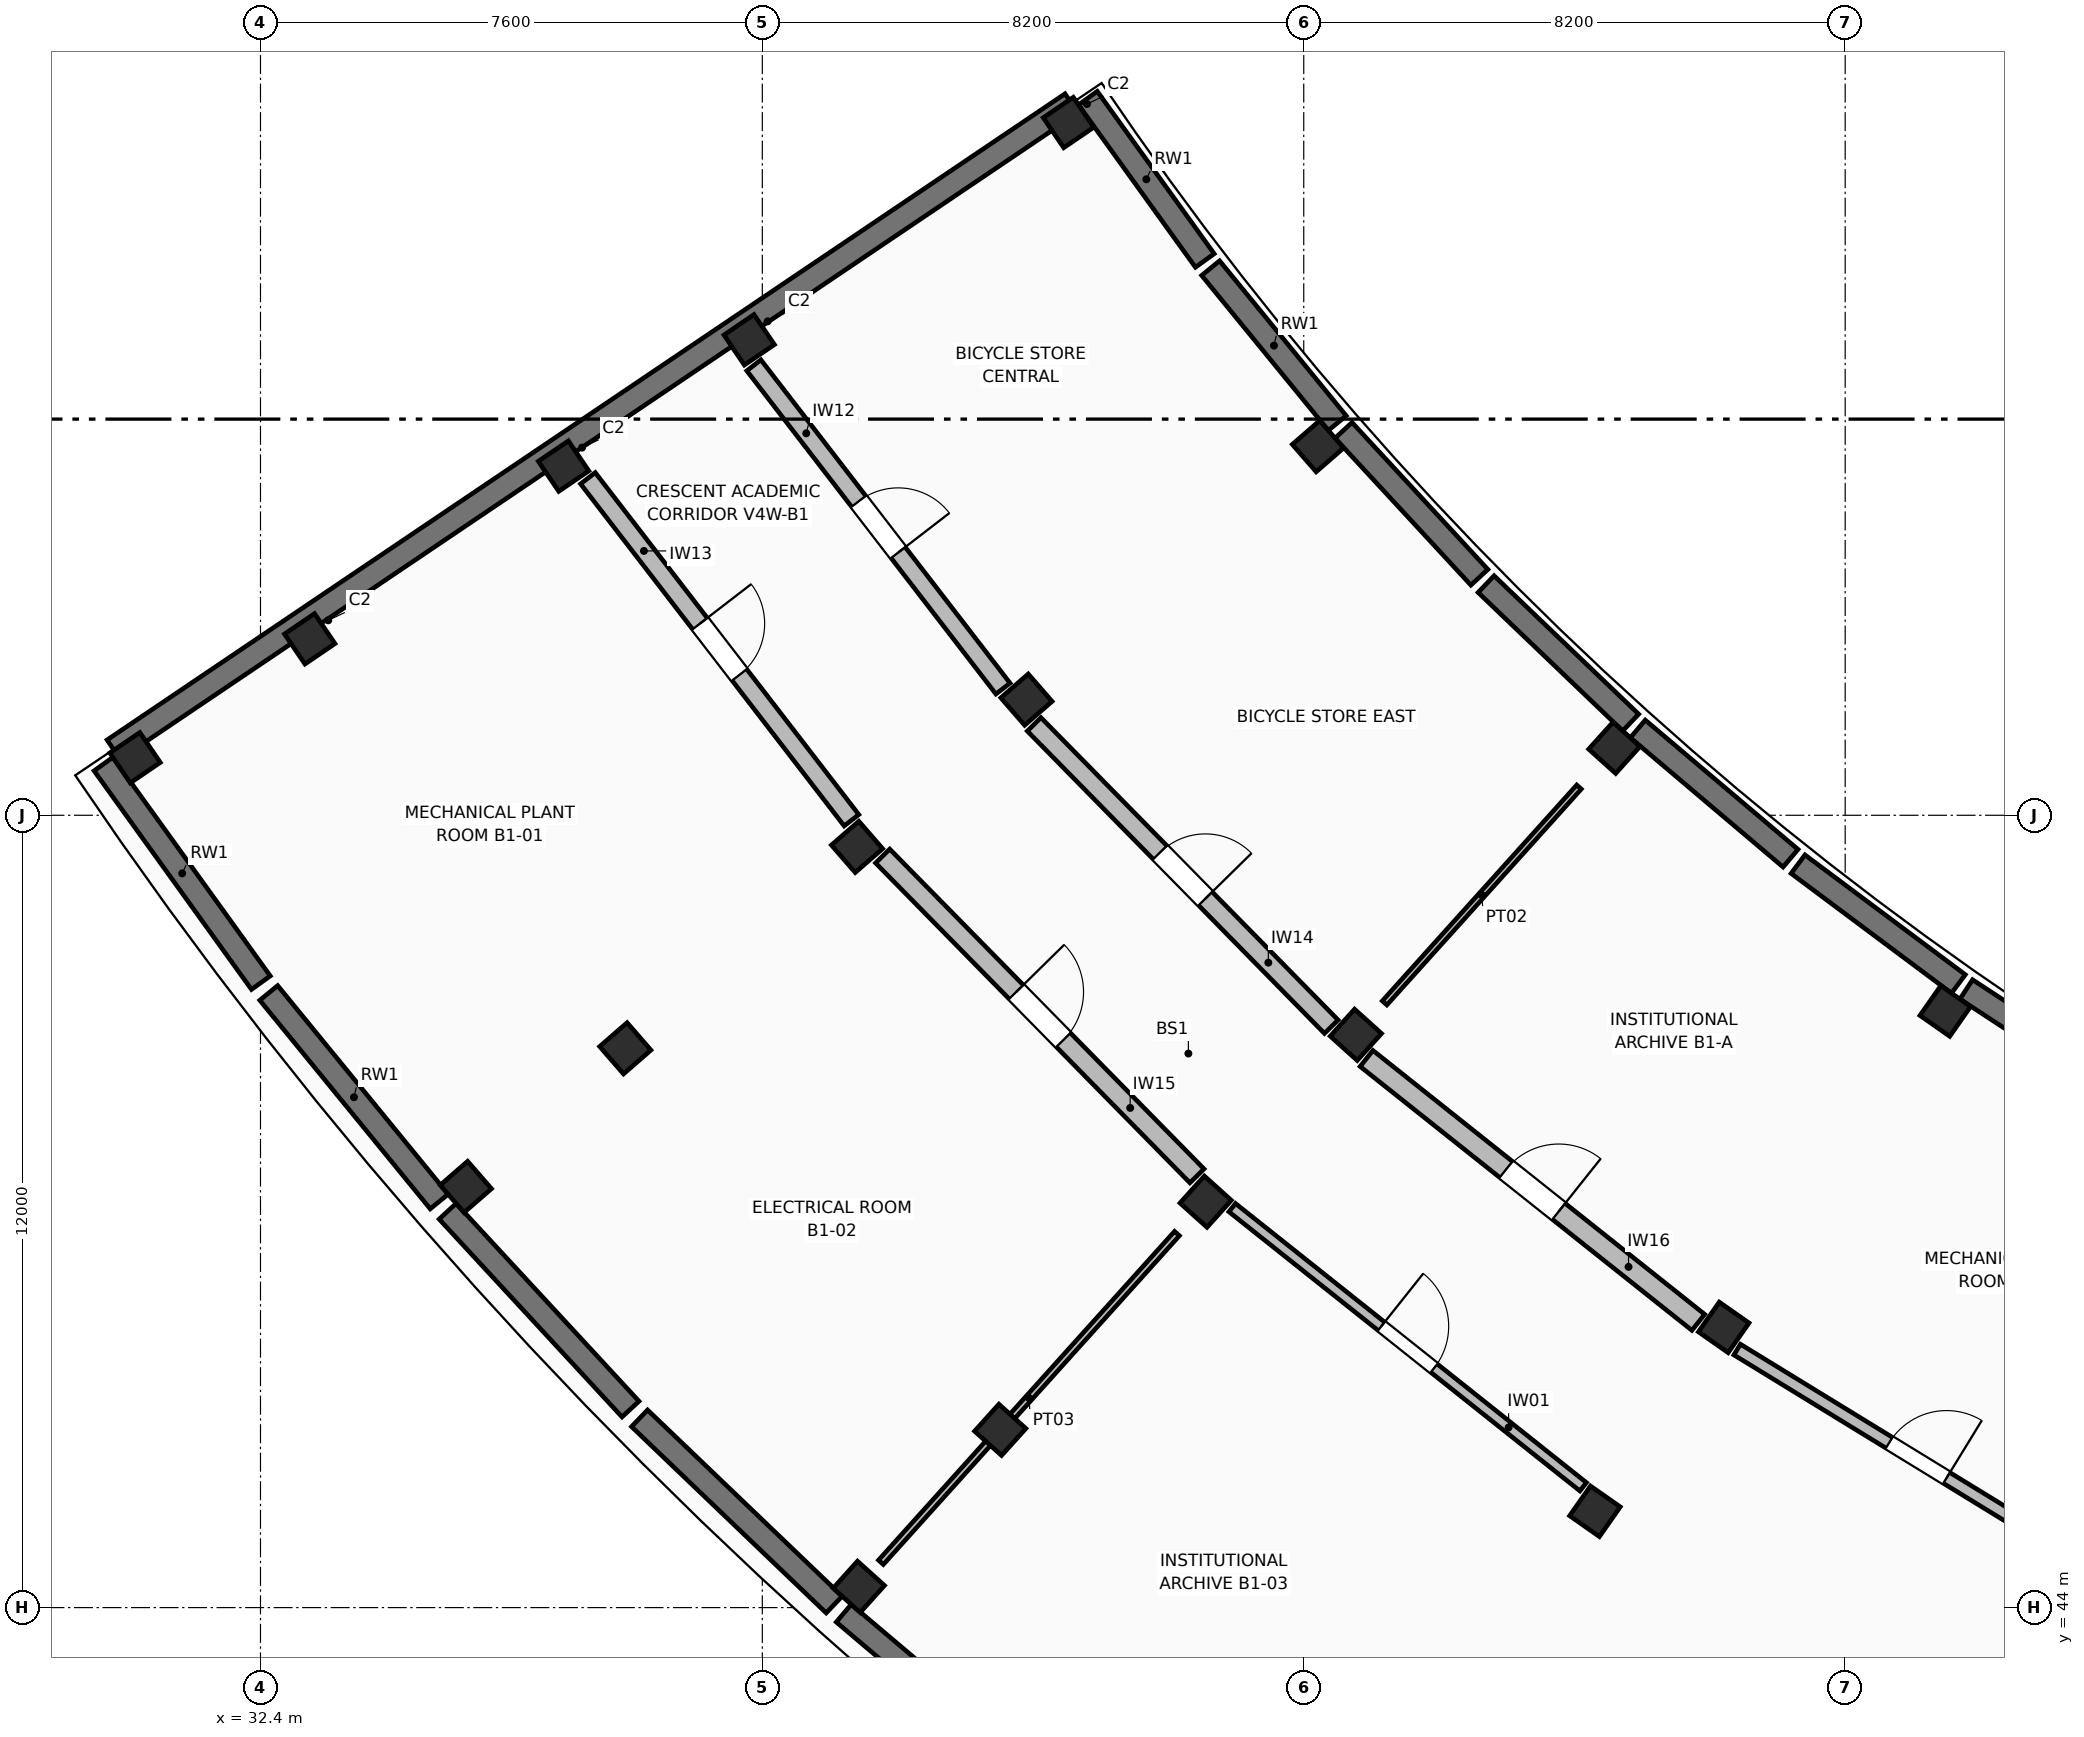
"""IFC4 building model, lengths in metres.
Left out: names, types, materials, properties, quantities, classifications, styles, units other than length and angle.
Written with IfcOpenShell. Run it as: python <this file> out.ifc"""

import sys

from ifc_helpers import new_model, si_unit, direction, frame, frame_2d, origin, origin_2d, place, context, subcontext, project, spatial, rectangle, extrude, element, fill, save


model = new_model("IFC4")
c1 = context("Model", 3, precision=1e-05, world=origin(), true_north=direction((0.0, 1.0)))
c2 = subcontext(c1, "Body", "Model", "MODEL_VIEW")
j1 = project(units=[si_unit("LENGTHUNIT", "METRE"), si_unit("PLANEANGLEUNIT", "RADIAN")], contexts=[c1])
p1 = place(None, origin())
s1 = spatial("IfcSite", under=j1, at=p1, CompositionType="ELEMENT")
p2 = place(p1, origin())
s2 = spatial("IfcBuilding", under=s1, at=p2, CompositionType="ELEMENT")
p3 = place(p2, frame((0.0, 0.0, -4.08)))
s3 = spatial("IfcBuildingStorey", under=s2, at=p3, CompositionType="ELEMENT", Elevation=-4.08)
for number, where, z_axis, x_axis in (
    (1, (44.637, 66.492, 0.0), (0.0, 0.0, 1.0), (-0.827, -0.563, 0.0)),
    (2, (39.801, 63.201, 0.0), (0.0, 0.0, 1.0), (-0.827, -0.563, 0.0)),
    (3, (36.99, 61.288, 0.0), (0.0, 0.0, 1.0), (-0.827, -0.563, 0.0)),
    (4, (33.146, 58.672, 0.0), (0.0, 0.0, 1.0), (-0.827, -0.563, 0.0)),
    (5, (30.5, 56.872, 0.0), (0.0, 0.0, 1.0), (-0.827, -0.563, 0.0)),
    (6, (48.416, 61.59, 0.0), (0.0, 0.0, 1.0), (-0.755, -0.656, 0.0)),
    (7, (44.0, 57.752, 0.0), (0.0, 0.0, 1.0), (-0.755, -0.656, 0.0)),
    (8, (41.434, 55.521, 0.0), (0.0, 0.0, 1.0), (-0.755, -0.656, 0.0)),
    (9, (37.925, 52.47, 0.0), (0.0, 0.0, 1.0), (-0.755, -0.656, 0.0)),
    (10, (35.51, 50.371, 0.0), (0.0, 0.0, 1.0), (-0.755, -0.656, 0.0)),
    (11, (52.904, 57.022, 0.0), (0.0, 0.0, 1.0), (-0.669, -0.743, 0.0)),
    (12, (48.99, 52.675, 0.0), (0.0, 0.0, 1.0), (-0.669, -0.743, 0.0)),
    (13, (46.715, 50.148, 0.0), (0.0, 0.0, 1.0), (-0.669, -0.743, 0.0)),
    (14, (43.603, 46.692, 0.0), (0.0, 0.0, 1.0), (-0.669, -0.743, 0.0)),
    (15, (41.462, 44.314, 0.0), (0.0, 0.0, 1.0), (-0.669, -0.743, 0.0)),
    (16, (57.916, 53.035, 0.0), (0.0, 0.0, 1.0), (-0.574, -0.819, 0.0)),
    (17, (54.561, 48.243, 0.0), (0.0, 0.0, 1.0), (-0.574, -0.819, 0.0)),
    (18, (52.61, 45.458, 0.0), (0.0, 0.0, 1.0), (-0.574, -0.819, 0.0)),
):
    element("IfcColumn", number, at=place(p3, frame(where, z_axis=z_axis, x_axis=x_axis)), inside=s3, PredefinedType="COLUMN", context=c2, shape_type="SweptSolid", body=[
        extrude(rectangle(XDim=0.55, YDim=0.55, at=origin_2d()), origin(), (0.0, 0.0, 1.0), 4.08),
    ])
p4 = place(p3, frame((44.931, 66.862, 0.0), z_axis=(0.0, 0.0, 1.0), x_axis=(0.584251673289, -0.811572536659, 0.0)))
e19 = element("IfcWall", 19, at=p4, inside=s3, PredefinedType="USERDEFINED", context=c2, shape_type="SweptSolid", body=[
    extrude(rectangle(XDim=3.031, YDim=0.35, at=frame_2d((1.515, 0.0))), origin(), (0.0, 0.0, 1.0), 3.065),
])
p5 = place(p3, frame((30.022, 56.775, 0.0), z_axis=(0.0, 0.0, 1.0), x_axis=(0.584279503148, -0.811552501198, 0.0)))
e20 = element("IfcWall", 20, at=p5, inside=s3, PredefinedType="USERDEFINED", context=c2, shape_type="SweptSolid", body=[
    extrude(rectangle(XDim=4.08, YDim=0.35, at=frame_2d((2.04, 0.0))), origin(), (0.0, 0.0, 1.0), 3.065),
])
p6 = place(p3, frame((46.79, 64.287, 0.0), z_axis=(0.0, 0.0, 1.0), x_axis=(0.632706899842, -0.77439136029, 0.0)))
e21 = element("IfcWall", 21, at=p6, inside=s3, PredefinedType="USERDEFINED", context=c2, shape_type="SweptSolid", body=[
    extrude(rectangle(XDim=3.031, YDim=0.35, at=frame_2d((1.516, 0.0))), origin(), (0.0, 0.0, 1.0), 3.065),
])
p7 = place(p3, frame((32.525, 53.309, 0.0), z_axis=(0.0, 0.0, 1.0), x_axis=(0.632696698526, -0.774399695037, 0.0)))
e22 = element("IfcWall", 22, at=p7, inside=s3, PredefinedType="USERDEFINED", context=c2, shape_type="SweptSolid", body=[
    extrude(rectangle(XDim=4.08, YDim=0.35, at=frame_2d((2.04, 0.0))), origin(), (0.0, 0.0, 1.0), 3.065),
])
p8 = place(p3, frame((48.803, 61.83, 0.0), z_axis=(0.0, 0.0, 1.0), x_axis=(0.678811877156, -0.734312219313, 0.0)))
e23 = element("IfcWall", 23, at=p8, inside=s3, PredefinedType="USERDEFINED", context=c2, shape_type="SweptSolid", body=[
    extrude(rectangle(XDim=3.031, YDim=0.35, at=frame_2d((1.515, 0.0))), origin(), (0.0, 0.0, 1.0), 3.065),
])
p9 = place(p3, frame((35.235, 50.002, 0.0), z_axis=(0.0, 0.0, 1.0), x_axis=(0.678764601476, -0.734355919009, 0.0)))
e24 = element("IfcWall", 24, at=p9, inside=s3, PredefinedType="USERDEFINED", context=c2, shape_type="SweptSolid", body=[
    extrude(rectangle(XDim=4.08, YDim=0.35, at=frame_2d((2.04, 0.0))), origin(), (0.0, 0.0, 1.0), 3.065),
])
p10 = place(p3, frame((50.962, 59.501, 0.0), z_axis=(0.0, 0.0, 1.0), x_axis=(0.722363654033, -0.691513377551, 0.0)))
e25 = element("IfcWall", 25, at=p10, inside=s3, PredefinedType="USERDEFINED", context=c2, shape_type="SweptSolid", body=[
    extrude(rectangle(XDim=3.031, YDim=0.35, at=frame_2d((1.516, 0.0))), origin(), (0.0, 0.0, 1.0), 3.065),
])
p11 = place(p3, frame((38.141, 46.867, 0.0), z_axis=(0.0, 0.0, 1.0), x_axis=(0.722376692903, -0.691499756725, 0.0)))
e26 = element("IfcWall", 26, at=p11, inside=s3, PredefinedType="USERDEFINED", context=c2, shape_type="SweptSolid", body=[
    extrude(rectangle(XDim=4.08, YDim=0.35, at=frame_2d((2.04, 0.0))), origin(), (0.0, 0.0, 1.0), 3.065),
])
p12 = place(p3, frame((53.259, 57.308, 0.0), z_axis=(0.0, 0.0, 1.0), x_axis=(0.763239603692, -0.646115552635, 0.0)))
e27 = element("IfcWall", 27, at=p12, inside=s3, PredefinedType="USERDEFINED", context=c2, shape_type="SweptSolid", body=[
    extrude(rectangle(XDim=3.031, YDim=0.35, at=frame_2d((1.515, 0.0))), origin(), (0.0, 0.0, 1.0), 3.065),
])
p13 = place(p3, frame((41.234, 43.915, 0.0), z_axis=(0.0, 0.0, 1.0), x_axis=(0.763204670494, -0.646156816057, 0.0)))
e28 = element("IfcWall", 28, at=p13, inside=s3, PredefinedType="USERDEFINED", context=c2, shape_type="SweptSolid", body=[
    extrude(rectangle(XDim=4.08, YDim=0.35, at=frame_2d((2.04, 0.0))), origin(), (0.0, 0.0, 1.0), 3.065),
])
p14 = place(p3, frame((55.686, 55.259, 0.0), z_axis=(0.0, 0.0, 1.0), x_axis=(0.801245208732, -0.598336122496, 0.0)))
e29 = element("IfcWall", 29, at=p14, inside=s3, PredefinedType="USERDEFINED", context=c2, shape_type="SweptSolid", body=[
    extrude(rectangle(XDim=3.031, YDim=0.35, at=frame_2d((1.515, 0.0))), origin(), (0.0, 0.0, 1.0), 3.065),
])
p15 = place(p3, frame((58.234, 53.363, 0.0), z_axis=(0.0, 0.0, 1.0), x_axis=(0.836276459037, -0.548308019328, 0.0)))
e30 = element("IfcWall", 30, at=p15, inside=s3, PredefinedType="USERDEFINED", context=c2, shape_type="SweptSolid", body=[
    extrude(rectangle(XDim=3.031, YDim=0.35, at=frame_2d((1.516, 0.0))), origin(), (0.0, 0.0, 1.0), 3.065),
])
p16 = place(p3, frame((44.683, 66.782, 0.0), z_axis=(0.0, 0.0, 1.0), x_axis=(-0.829039791681, -0.559189613468, 0.0)))
e31 = element("IfcWall", 31, at=p16, inside=s3, PredefinedType="USERDEFINED", context=c2, shape_type="SweptSolid", body=[
    extrude(rectangle(XDim=17.5, YDim=0.35, at=frame_2d((8.75, 0.0))), origin(), (0.0, 0.0, 1.0), 3.065),
])
p17 = place(p3, frame((39.872, 62.815, 0.0), z_axis=(0.0, 0.0, 1.0), x_axis=(0.610376740954, -0.79211125109, 0.0)))
e32 = element("IfcWall", 32, at=p17, inside=s3, PredefinedType="STANDARD", context=c2, shape_type="SweptSolid", body=[
    extrude(rectangle(XDim=6.181, YDim=0.27, at=frame_2d((3.09, 0.0))), origin(), (0.0, 0.0, 1.0), 2.72),
])
p18 = place(p17, frame((2.601, 0.0, 0.0)))
e33 = element("IfcOpeningElement", 33, at=p18, cuts=e32, PredefinedType="OPENING", context=c2, shape_type="SweptSolid", body=[
    extrude(rectangle(XDim=0.98, YDim=2.12, at=frame_2d((0.49, 1.06))), frame((0.0, 0.145, 0.0), z_axis=(0.0, -1.0, 0.0), x_axis=(1.0, 0.0, 0.0)), (0.0, 0.0, 1.0), 0.29),
])
p19 = place(p3, frame((37.359, 61.104, 0.0), z_axis=(0.0, 0.0, 1.0), x_axis=(0.610378079511, -0.792110219637, 0.0)))
e34 = element("IfcWall", 34, at=p19, inside=s3, PredefinedType="STANDARD", context=c2, shape_type="SweptSolid", body=[
    extrude(rectangle(XDim=6.54, YDim=0.28, at=frame_2d((3.27, 0.0))), origin(), (0.0, 0.0, 1.0), 2.72),
])
p20 = place(p19, frame((2.78, 0.0, 0.0)))
e35 = element("IfcOpeningElement", 35, at=p20, cuts=e34, PredefinedType="OPENING", context=c2, shape_type="SweptSolid", body=[
    extrude(rectangle(XDim=0.98, YDim=2.18, at=frame_2d((0.49, 1.09))), frame((0.0, 0.15, 0.0), z_axis=(0.0, -1.0, 0.0), x_axis=(1.0, 0.0, 0.0)), (0.0, 0.0, 1.0), 0.3),
])
p21 = place(p3, frame((44.117, 57.377, 0.0), z_axis=(0.0, 0.0, 1.0), x_axis=(0.700900509406, -0.713259052459, 0.0)))
e36 = element("IfcWall", 36, at=p21, inside=s3, PredefinedType="STANDARD", context=c2, shape_type="SweptSolid", body=[
    extrude(rectangle(XDim=6.42, YDim=0.29, at=frame_2d((3.21, 0.0))), origin(), (0.0, 0.0, 1.0), 2.72),
])
p22 = place(p21, frame((2.72, 0.0, 0.0)))
e37 = element("IfcOpeningElement", 37, at=p22, cuts=e36, PredefinedType="OPENING", context=c2, shape_type="SweptSolid", body=[
    extrude(rectangle(XDim=0.98, YDim=2.24, at=frame_2d((0.49, 1.12))), frame((0.0, 0.155, 0.0), z_axis=(0.0, -1.0, 0.0), x_axis=(1.0, 0.0, 0.0)), (0.0, 0.0, 1.0), 0.31),
])
p23 = place(p3, frame((41.823, 55.383, 0.0), z_axis=(0.0, 0.0, 1.0), x_axis=(0.700914816473, -0.713244993006, 0.0)))
e38 = element("IfcWall", 38, at=p23, inside=s3, PredefinedType="STANDARD", context=c2, shape_type="SweptSolid", body=[
    extrude(rectangle(XDim=6.792, YDim=0.3, at=frame_2d((3.396, 0.0))), origin(), (0.0, 0.0, 1.0), 2.72),
])
p24 = place(p23, frame((2.886, 0.0, 0.0)))
e39 = element("IfcOpeningElement", 39, at=p24, cuts=e38, PredefinedType="OPENING", context=c2, shape_type="SweptSolid", body=[
    extrude(rectangle(XDim=1.02, YDim=2.06, at=frame_2d((0.51, 1.03))), frame((0.0, 0.16, 0.0), z_axis=(0.0, -1.0, 0.0), x_axis=(1.0, 0.0, 0.0)), (0.0, 0.0, 1.0), 0.32),
])
p25 = place(p3, frame((49.151, 52.317, 0.0), z_axis=(0.0, 0.0, 1.0), x_axis=(0.782605685559, -0.622517743467, 0.0)))
e40 = element("IfcWall", 40, at=p25, inside=s3, PredefinedType="STANDARD", context=c2, shape_type="SweptSolid", body=[
    extrude(rectangle(XDim=6.42, YDim=0.31, at=frame_2d((3.21, 0.0))), origin(), (0.0, 0.0, 1.0), 2.72),
])
p26 = place(p25, frame((2.7, 0.0, 0.0)))
e41 = element("IfcOpeningElement", 41, at=p26, cuts=e40, PredefinedType="OPENING", context=c2, shape_type="SweptSolid", body=[
    extrude(rectangle(XDim=1.02, YDim=2.12, at=frame_2d((0.51, 1.06))), frame((0.0, 0.165, 0.0), z_axis=(0.0, -1.0, 0.0), x_axis=(1.0, 0.0, 0.0)), (0.0, 0.0, 1.0), 0.33),
])
p27 = place(p3, frame((47.117, 50.058, 0.0), z_axis=(0.0, 0.0, 1.0), x_axis=(0.782615780998, -0.622505051653, 0.0)))
e42 = element("IfcWall", 42, at=p27, inside=s3, PredefinedType="STANDARD", context=c2, shape_type="SweptSolid", body=[
    extrude(rectangle(XDim=6.792, YDim=0.16, at=frame_2d((3.396, 0.0))), origin(), (0.0, 0.0, 1.0), 2.72),
])
p28 = place(p27, frame((2.886, 0.0, 0.0)))
e43 = element("IfcOpeningElement", 43, at=p28, cuts=e42, PredefinedType="OPENING", context=c2, shape_type="SweptSolid", body=[
    extrude(rectangle(XDim=1.02, YDim=2.18, at=frame_2d((0.51, 1.09))), frame((0.0, 0.09, 0.0), z_axis=(0.0, -1.0, 0.0), x_axis=(1.0, 0.0, 0.0)), (0.0, 0.0, 1.0), 0.18),
])
p29 = place(p3, frame((52.369, 56.427, 0.0), z_axis=(0.0, 0.0, 1.0), x_axis=(-0.669157836149, -0.743120306761, 0.0)))
e44 = element("IfcWall", 44, at=p29, inside=s3, PredefinedType="PARTITIONING", context=c2, shape_type="SweptSolid", body=[
    extrude(rectangle(XDim=4.4, YDim=0.092, at=frame_2d((2.2, 0.0))), origin(), (0.0, 0.0, 1.0), 2.72),
])
p30 = place(p3, frame((46.28, 49.665, 0.0), z_axis=(0.0, 0.0, 1.0), x_axis=(-0.669115705072, -0.743158242386, 0.0)))
e45 = element("IfcWall", 45, at=p30, inside=s3, PredefinedType="PARTITIONING", context=c2, shape_type="SweptSolid", body=[
    extrude(rectangle(XDim=6.7, YDim=0.098, at=frame_2d((3.35, 0.0))), origin(), (0.0, 0.0, 1.0), 2.72),
])
p31 = place(p3, frame((54.764, 47.908, 0.0), z_axis=(0.0, 0.0, 1.0), x_axis=(0.852626937867, -0.522520147767, 0.0)))
e46 = element("IfcWall", 46, at=p31, inside=s3, PredefinedType="STANDARD", context=c2, shape_type="SweptSolid", body=[
    extrude(rectangle(XDim=6.42, YDim=0.19, at=frame_2d((3.21, 0.0))), origin(), (0.0, 0.0, 1.0), 2.72),
])
p32 = place(p31, frame((2.7, 0.0, 0.0)))
e47 = element("IfcOpeningElement", 47, at=p32, cuts=e46, PredefinedType="OPENING", context=c2, shape_type="SweptSolid", body=[
    extrude(rectangle(XDim=1.02, YDim=2.24, at=frame_2d((0.51, 1.12))), frame((0.0, 0.105, 0.0), z_axis=(0.0, -1.0, 0.0), x_axis=(1.0, 0.0, 0.0)), (0.0, 0.0, 1.0), 0.21),
])
p33 = place(p18, frame((0.98, 0.0, 0.0), z_axis=(0.0, 0.0, 1.0), x_axis=(-1.0, 0.0, 0.0)))
e48 = element("IfcDoor", 48, at=p33, inside=s3, OperationType="SINGLE_SWING_RIGHT", PredefinedType="DOOR", context=c2, shape_type="SweptSolid", body=[
    extrude(rectangle(XDim=0.98, YDim=2.12, at=frame_2d((0.49, 1.06))), frame((0.0, 0.025, 0.0), z_axis=(0.0, -1.0, 0.0), x_axis=(1.0, 0.0, 0.0)), (0.0, 0.0, 1.0), 0.05),
])
fill(e33, e48)
p34 = place(p20, origin())
e49 = element("IfcDoor", 49, at=p34, inside=s3, OperationType="SINGLE_SWING_LEFT", PredefinedType="DOOR", context=c2, shape_type="SweptSolid", body=[
    extrude(rectangle(XDim=0.98, YDim=2.18, at=frame_2d((0.49, 1.09))), frame((0.0, 0.025, 0.0), z_axis=(0.0, -1.0, 0.0), x_axis=(1.0, 0.0, 0.0)), (0.0, 0.0, 1.0), 0.05),
])
fill(e35, e49)
p35 = place(p22, frame((0.98, 0.0, 0.0), z_axis=(0.0, 0.0, 1.0), x_axis=(-1.0, 0.0, 0.0)))
e50 = element("IfcDoor", 50, at=p35, inside=s3, OperationType="SINGLE_SWING_RIGHT", PredefinedType="DOOR", context=c2, shape_type="SweptSolid", body=[
    extrude(rectangle(XDim=0.98, YDim=2.24, at=frame_2d((0.49, 1.12))), frame((0.0, 0.025, 0.0), z_axis=(0.0, -1.0, 0.0), x_axis=(1.0, 0.0, 0.0)), (0.0, 0.0, 1.0), 0.05),
])
fill(e37, e50)
p36 = place(p24, origin())
e51 = element("IfcDoor", 51, at=p36, inside=s3, OperationType="SINGLE_SWING_LEFT", PredefinedType="DOOR", context=c2, shape_type="SweptSolid", body=[
    extrude(rectangle(XDim=1.02, YDim=2.06, at=frame_2d((0.51, 1.03))), frame((0.0, 0.025, 0.0), z_axis=(0.0, -1.0, 0.0), x_axis=(1.0, 0.0, 0.0)), (0.0, 0.0, 1.0), 0.05),
])
fill(e39, e51)
p37 = place(p26, frame((1.02, 0.0, 0.0), z_axis=(0.0, 0.0, 1.0), x_axis=(-1.0, 0.0, 0.0)))
e52 = element("IfcDoor", 52, at=p37, inside=s3, OperationType="SINGLE_SWING_RIGHT", PredefinedType="DOOR", context=c2, shape_type="SweptSolid", body=[
    extrude(rectangle(XDim=1.02, YDim=2.12, at=frame_2d((0.51, 1.06))), frame((0.0, 0.025, 0.0), z_axis=(0.0, -1.0, 0.0), x_axis=(1.0, 0.0, 0.0)), (0.0, 0.0, 1.0), 0.05),
])
fill(e41, e52)
p38 = place(p28, origin())
e53 = element("IfcDoor", 53, at=p38, inside=s3, OperationType="SINGLE_SWING_LEFT", PredefinedType="DOOR", context=c2, shape_type="SweptSolid", body=[
    extrude(rectangle(XDim=1.02, YDim=2.18, at=frame_2d((0.51, 1.09))), frame((0.0, 0.025, 0.0), z_axis=(0.0, -1.0, 0.0), x_axis=(1.0, 0.0, 0.0)), (0.0, 0.0, 1.0), 0.05),
])
fill(e43, e53)
p39 = place(p32, frame((1.02, 0.0, 0.0), z_axis=(0.0, 0.0, 1.0), x_axis=(-1.0, 0.0, 0.0)))
e54 = element("IfcDoor", 54, at=p39, inside=s3, OperationType="SINGLE_SWING_RIGHT", PredefinedType="DOOR", context=c2, shape_type="SweptSolid", body=[
    extrude(rectangle(XDim=1.02, YDim=2.24, at=frame_2d((0.51, 1.12))), frame((0.0, 0.025, 0.0), z_axis=(0.0, -1.0, 0.0), x_axis=(1.0, 0.0, 0.0)), (0.0, 0.0, 1.0), 0.05),
])
fill(e47, e54)
save(model, sys.argv[1])
